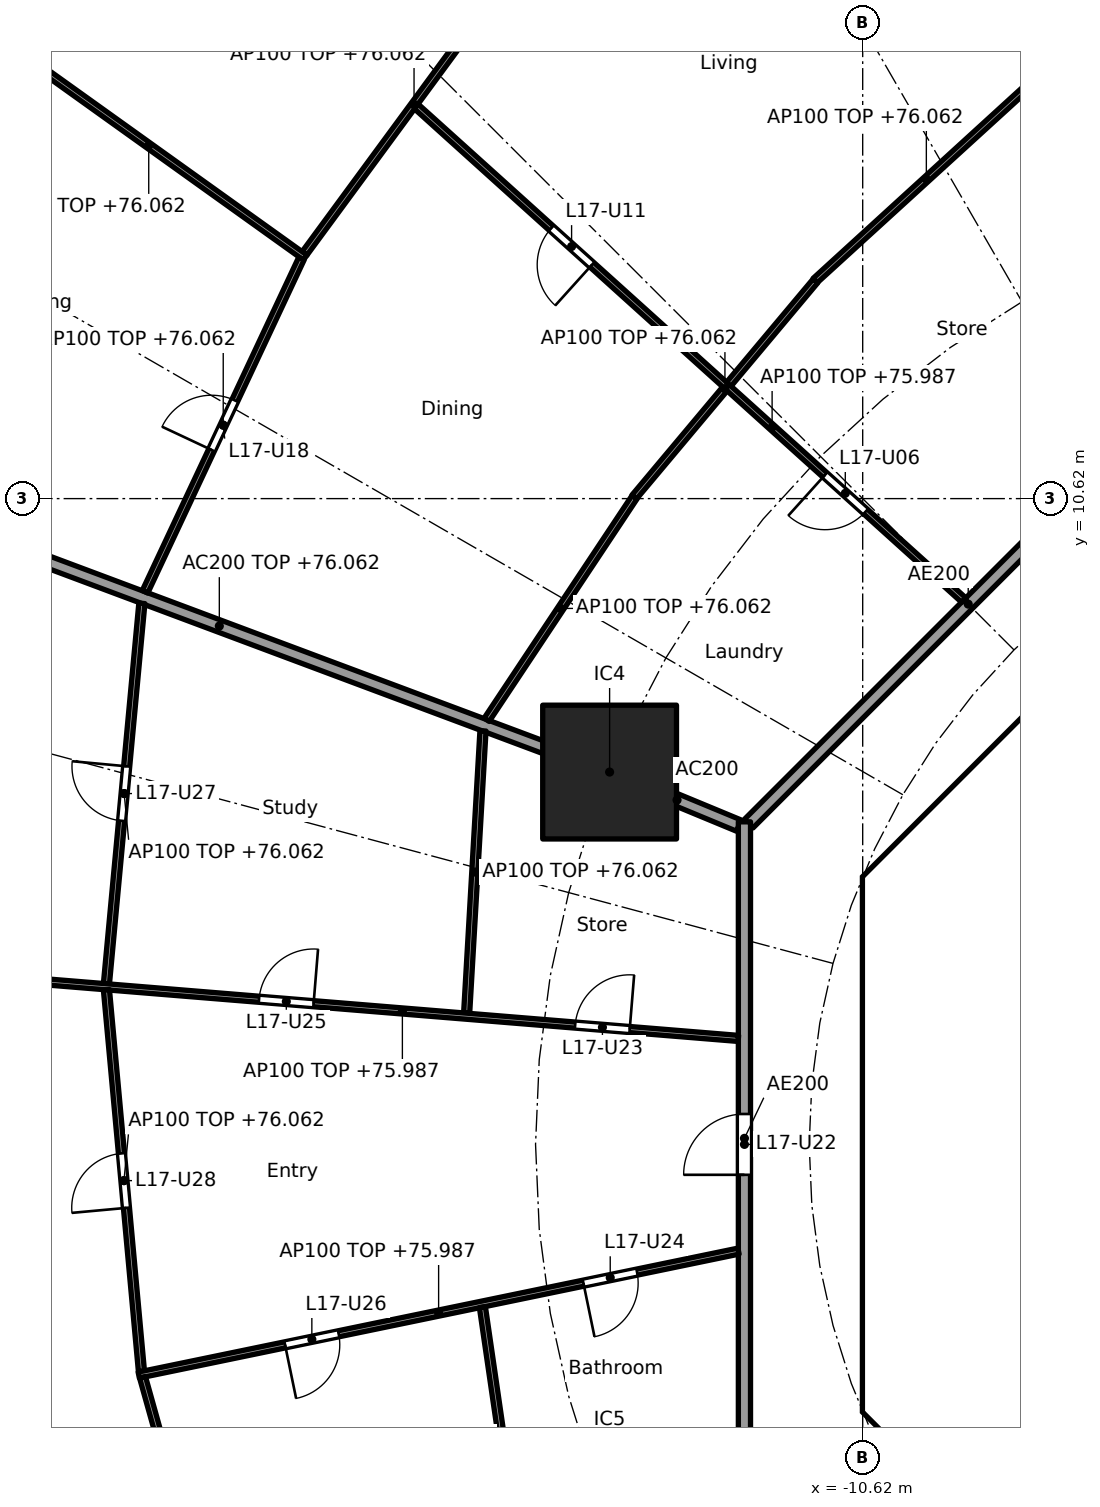
"""IFC4 building model, lengths in metres.
Left out: names, types, materials, properties, quantities, classifications, styles, units other than length and angle.
Written with IfcOpenShell. Run it as: python <this file> out.ifc"""

import sys

from ifc_helpers import new_model, si_unit, direction, frame, frame_2d, origin, origin_2d, place, context, subcontext, project, spatial, polyline, rectangle, outline, extrude, element, fill, save


model = new_model("IFC4")
c1 = context("Model", 3, precision=1e-05, world=origin(), true_north=direction((0.0, 1.0)))
c2 = subcontext(c1, "Body", "Model", "MODEL_VIEW")
j1 = project(units=[si_unit("LENGTHUNIT", "METRE"), si_unit("PLANEANGLEUNIT", "RADIAN")], contexts=[c1])
p1 = place(None, origin())
s1 = spatial("IfcSite", under=j1, at=p1, CompositionType="ELEMENT")
p2 = place(p1, origin())
s2 = spatial("IfcBuilding", under=s1, at=p2, CompositionType="ELEMENT")
p3 = place(p2, frame((0.0, 0.0, 73.3)))
s3 = spatial("IfcBuildingStorey", under=s2, at=p3, CompositionType="ELEMENT", Elevation=73.3)
p4 = place(p3, frame((-14.782, 6.123, 0.0), z_axis=(0.0, 0.0, 1.0), x_axis=(1.0, 0.0, 0.0)))
e1 = element("IfcColumn", 1, at=p4, inside=s3, PredefinedType="COLUMN", context=c2, shape_type="SweptSolid", body=[
    extrude(rectangle(XDim=2.2, YDim=2.2, at=origin_2d()), origin(), (0.0, 0.0, 1.0), 3.7),
])
p5 = place(p3, frame((-4.613, 9.988, 0.0), z_axis=(0.0, 0.0, 1.0), x_axis=(-0.707106781187, -0.707106781187, 0.0)))
e2 = element("IfcWall", 2, at=p5, inside=s3, PredefinedType="SHEAR", context=c2, shape_type="SweptSolid", body=[
    extrude(rectangle(XDim=7.602, YDim=0.6, at=frame_2d((3.801, 0.0))), origin(), (0.0, 0.0, 1.0), 3.44),
])
p6 = place(p5, frame((0.351, 0.0, 0.0)))
e3 = element("IfcOpeningElement", 3, at=p6, cuts=e2, PredefinedType="OPENING", context=c2, shape_type="SweptSolid", body=[
    extrude(rectangle(XDim=1.1, YDim=2.1, at=frame_2d((0.55, 1.05))), frame((0.0, 0.31, 0.0), z_axis=(0.0, -1.0, 0.0), x_axis=(1.0, 0.0, 0.0)), (0.0, 0.0, 1.0), 0.62),
])
p7 = place(p3, frame((-10.325, 3.801, 0.0), z_axis=(0.0, 0.0, 1.0), x_axis=(0.0, -1.0, 0.0)))
e4 = element("IfcWall", 4, at=p7, inside=s3, PredefinedType="SHEAR", context=c2, shape_type="SweptSolid", body=[
    extrude(rectangle(XDim=7.602, YDim=0.6, at=frame_2d((3.801, 0.0))), origin(), (0.0, 0.0, 1.0), 3.44),
])
p8 = place(p7, frame((0.651, 0.0, 0.0)))
e5 = element("IfcOpeningElement", 5, at=p8, cuts=e4, PredefinedType="OPENING", context=c2, shape_type="SweptSolid", body=[
    extrude(rectangle(XDim=1.5, YDim=2.1, at=frame_2d((0.75, 1.05))), frame((0.0, 0.31, 0.0), z_axis=(0.0, -1.0, 0.0), x_axis=(1.0, 0.0, 0.0)), (0.0, 0.0, 1.0), 0.62),
])
p9 = place(p7, frame((5.451, 0.0, 0.0)))
e6 = element("IfcOpeningElement", 6, at=p9, cuts=e4, PredefinedType="OPENING", context=c2, shape_type="SweptSolid", body=[
    extrude(rectangle(XDim=1.5, YDim=2.1, at=frame_2d((0.75, 1.05))), frame((0.0, 0.31, 0.0), z_axis=(0.0, -1.0, 0.0), x_axis=(1.0, 0.0, 0.0)), (0.0, 0.0, 1.0), 0.62),
])
p10 = place(p3, frame((-9.988, -4.613, 0.0), z_axis=(0.0, 0.0, 1.0), x_axis=(0.707106781187, -0.707106781187, 0.0)))
e7 = element("IfcWall", 7, at=p10, inside=s3, PredefinedType="SHEAR", context=c2, shape_type="SweptSolid", body=[
    extrude(rectangle(XDim=7.602, YDim=0.6, at=frame_2d((3.801, 0.0))), origin(), (0.0, 0.0, 1.0), 3.44),
])
p11 = place(p10, frame((6.151, 0.0, 0.0)))
e8 = element("IfcOpeningElement", 8, at=p11, cuts=e7, PredefinedType="OPENING", context=c2, shape_type="SweptSolid", body=[
    extrude(rectangle(XDim=1.1, YDim=2.1, at=frame_2d((0.55, 1.05))), frame((0.0, 0.31, 0.0), z_axis=(0.0, -1.0, 0.0), x_axis=(1.0, 0.0, 0.0)), (0.0, 0.0, 1.0), 0.62),
])
p12 = place(p3, origin())
e9 = element("IfcWall", 9, at=p12, inside=s3, PredefinedType="SHEAR", context=c2, shape_type="SweptSolid", body=[
    extrude(outline(polyline([(-10.625, -3.801), (-10.025, -3.801), (-10.025, -4.152), (-9.776, -4.401), (-10.2, -4.825), (-10.625, -4.401), (-10.625, -3.801)])), origin(), (0.0, 0.0, 1.0), 3.44),
])
p13 = place(p3, origin())
e10 = element("IfcWall", 10, at=p13, inside=s3, PredefinedType="SHEAR", context=c2, shape_type="SweptSolid", body=[
    extrude(outline(polyline([(-10.2, 4.825), (-9.776, 4.401), (-10.025, 4.152), (-10.025, 3.801), (-10.625, 3.801), (-10.625, 4.401), (-10.2, 4.825)])), origin(), (0.0, 0.0, 1.0), 3.44),
])
for number, where, z_axis, x_axis in (
    (11, (-10.025, -4.0, 0.0), (0.0, 0.0, 1.0), (1.0, 0.0, 0.0)),
    (12, (-10.025, 4.0, 0.0), (0.0, 0.0, 1.0), (1.0, 0.0, 0.0)),
):
    element("IfcWall", number, at=place(p3, frame(where, z_axis=z_axis, x_axis=x_axis)), inside=s3, PredefinedType="PARTITIONING", context=c2, shape_type="SweptSolid", body=[
        extrude(rectangle(XDim=3.325, YDim=0.2, at=frame_2d((1.662, 0.0))), origin(), (0.0, 0.0, 1.0), 3.44),
    ])
p14 = place(p3, frame((-8.301, 5.8, 0.0), z_axis=(0.0, 0.0, 1.0), x_axis=(1.0, 0.0, 0.0)))
e13 = element("IfcWall", 13, at=p14, inside=s3, PredefinedType="PARTITIONING", context=c2, shape_type="SweptSolid", body=[
    extrude(rectangle(XDim=2.026, YDim=0.15, at=frame_2d((1.013, 0.0))), origin(), (0.0, 0.0, 1.0), 3.44),
])
p15 = place(p3, frame((-12.657, 5.243, 0.0), z_axis=(0.0, 0.0, 1.0), x_axis=(-0.923843626288, 0.382770106157, 0.0)))
e14 = element("IfcWall", 14, at=p15, inside=s3, PredefinedType="PARTITIONING", context=c2, shape_type="SweptSolid", body=[
    extrude(rectangle(XDim=2.199, YDim=0.2, at=frame_2d((1.1, 0.0))), origin(), (0.0, 0.0, 1.0), 3.44),
])
p16 = place(p3, frame((-14.829, 6.14, 0.0), z_axis=(0.0, 0.0, 1.0), x_axis=(-0.936597324342, 0.35040755134, 0.0)))
e15 = element("IfcWall", 15, at=p16, inside=s3, PredefinedType="PARTITIONING", context=c2, shape_type="SweptSolid", body=[
    extrude(rectangle(XDim=13.606, YDim=0.2, at=frame_2d((6.803, 0.0))), origin(), (0.0, 0.0, 1.0), 2.762),
])
p17 = place(p3, frame((-5.275, 12.494, 0.0), z_axis=(0.0, 0.0, 1.0), x_axis=(-0.707106781187, -0.707106781187, 0.0)))
e16 = element("IfcWall", 16, at=p17, inside=s3, PredefinedType="PARTITIONING", context=c2, shape_type="SweptSolid", body=[
    extrude(rectangle(XDim=10.209, YDim=0.2, at=frame_2d((5.104, 0.0))), origin(), (0.0, 0.0, 1.0), 3.44),
])
p18 = place(p3, frame((-12.565, 5.304, 0.0), z_axis=(0.0, 0.0, 1.0), x_axis=(0.0, -1.0, 0.0)))
e17 = element("IfcWall", 17, at=p18, inside=s3, PredefinedType="PARTITIONING", context=c2, shape_type="SweptSolid", body=[
    extrude(rectangle(XDim=10.409, YDim=0.2, at=frame_2d((5.205, 0.0))), origin(), (0.0, 0.0, 1.0), 3.44),
])
p19 = place(p18, frame((4.804, 0.0, 0.0)))
e18 = element("IfcOpeningElement", 18, at=p19, cuts=e17, PredefinedType="OPENING", context=c2, shape_type="SweptSolid", body=[
    extrude(rectangle(XDim=1.0, YDim=2.1, at=frame_2d((0.5, 1.05))), frame((0.0, 0.11, 0.0), z_axis=(0.0, -1.0, 0.0), x_axis=(1.0, 0.0, 0.0)), (0.0, 0.0, 1.0), 0.22),
])
p20 = place(p3, frame((-6.072, 17.915, 0.0), z_axis=(0.0, 0.0, 1.0), x_axis=(-0.404139814253, 0.914697223422, 0.0)))
e19 = element("IfcWall", 19, at=p20, inside=s3, PredefinedType="PARTITIONING", context=c2, shape_type="SweptSolid", body=[
    extrude(rectangle(XDim=15.614, YDim=0.1, at=frame_2d((7.807, 0.0))), origin(), (0.0, 0.0, 1.0), 2.837),
])
p21 = place(p20, frame((3.226, 0.0, 0.0)))
e20 = element("IfcOpeningElement", 20, at=p21, cuts=e19, PredefinedType="OPENING", context=c2, shape_type="SweptSolid", body=[
    extrude(rectangle(XDim=0.9, YDim=2.1, at=frame_2d((0.45, 1.05))), frame((0.0, 0.06, 0.0), z_axis=(0.0, -1.0, 0.0), x_axis=(1.0, 0.0, 0.0)), (0.0, 0.0, 1.0), 0.12),
])
p22 = place(p3, frame((-7.746, 17.539, 0.0), z_axis=(0.0, 0.0, 1.0), x_axis=(-0.738860434967, -0.673858484877, 0.0)))
e21 = element("IfcWall", 21, at=p22, inside=s3, PredefinedType="PARTITIONING", context=c2, shape_type="SweptSolid", body=[
    extrude(rectangle(XDim=4.947, YDim=0.1, at=frame_2d((2.473, 0.0))), origin(), (0.0, 0.0, 1.0), 2.762),
])
p23 = place(p3, frame((-11.396, 14.202, 0.0), z_axis=(0.0, 0.0, 1.0), x_axis=(-0.642475660273, -0.766306091557, 0.0)))
e22 = element("IfcWall", 22, at=p23, inside=s3, PredefinedType="PARTITIONING", context=c2, shape_type="SweptSolid", body=[
    extrude(rectangle(XDim=4.637, YDim=0.1, at=frame_2d((2.319, 0.0))), origin(), (0.0, 0.0, 1.0), 2.762),
])
p24 = place(p3, frame((-16.197, 19.551, 0.0), z_axis=(0.0, 0.0, 1.0), x_axis=(-0.592391983588, -0.80564988536, 0.0)))
e23 = element("IfcWall", 23, at=p24, inside=s3, PredefinedType="PARTITIONING", context=c2, shape_type="SweptSolid", body=[
    extrude(rectangle(XDim=6.08, YDim=0.1, at=frame_2d((3.04, 0.0))), origin(), (0.0, 0.0, 1.0), 2.762),
])
p25 = place(p3, frame((-8.959, 8.952, 0.0), z_axis=(0.0, 0.0, 1.0), x_axis=(-0.742679904999, 0.669646592398, 0.0)))
e24 = element("IfcWall", 24, at=p25, inside=s3, PredefinedType="PARTITIONING", context=c2, shape_type="SweptSolid", body=[
    extrude(rectangle(XDim=12.121, YDim=0.1, at=frame_2d((6.061, 0.0))), origin(), (0.0, 0.0, 1.0), 2.687),
])
p26 = place(p25, frame((2.172, 0.0, 0.0)))
e25 = element("IfcOpeningElement", 25, at=p26, cuts=e24, PredefinedType="OPENING", context=c2, shape_type="SweptSolid", body=[
    extrude(rectangle(XDim=0.9, YDim=2.1, at=frame_2d((0.45, 1.05))), frame((0.0, 0.06, 0.0), z_axis=(0.0, -1.0, 0.0), x_axis=(1.0, 0.0, 0.0)), (0.0, 0.0, 1.0), 0.12),
])
p27 = place(p25, frame((8.233, 0.0, 0.0)))
e26 = element("IfcOpeningElement", 26, at=p27, cuts=e24, PredefinedType="OPENING", context=c2, shape_type="SweptSolid", body=[
    extrude(rectangle(XDim=0.9, YDim=2.1, at=frame_2d((0.45, 1.05))), frame((0.0, 0.06, 0.0), z_axis=(0.0, -1.0, 0.0), x_axis=(1.0, 0.0, 0.0)), (0.0, 0.0, 1.0), 0.12),
])
p28 = place(p3, frame((-14.371, 10.645, 0.0), z_axis=(0.0, 0.0, 1.0), x_axis=(-0.553341009285, -0.832954817168, 0.0)))
e27 = element("IfcWall", 27, at=p28, inside=s3, PredefinedType="PARTITIONING", context=c2, shape_type="SweptSolid", body=[
    extrude(rectangle(XDim=4.396, YDim=0.1, at=frame_2d((2.198, 0.0))), origin(), (0.0, 0.0, 1.0), 2.762),
])
p29 = place(p3, frame((-19.788, 14.583, 0.0), z_axis=(0.0, 0.0, 1.0), x_axis=(-0.813175286569, 0.58201885993, 0.0)))
e28 = element("IfcWall", 28, at=p29, inside=s3, PredefinedType="PARTITIONING", context=c2, shape_type="SweptSolid", body=[
    extrude(rectangle(XDim=6.329, YDim=0.1, at=frame_2d((3.164, 0.0))), origin(), (0.0, 0.0, 1.0), 2.762),
])
p30 = place(p3, frame((-19.85, 14.567, 0.0), z_axis=(0.0, 0.0, 1.0), x_axis=(-0.424942210745, -0.905220480064, 0.0)))
e29 = element("IfcWall", 29, at=p30, inside=s3, PredefinedType="PARTITIONING", context=c2, shape_type="SweptSolid", body=[
    extrude(rectangle(XDim=6.053, YDim=0.1, at=frame_2d((3.027, 0.0))), origin(), (0.0, 0.0, 1.0), 2.762),
])
p31 = place(p30, frame((2.577, 0.0, 0.0)))
e30 = element("IfcOpeningElement", 30, at=p31, cuts=e29, PredefinedType="OPENING", context=c2, shape_type="SweptSolid", body=[
    extrude(rectangle(XDim=0.9, YDim=2.1, at=frame_2d((0.45, 1.05))), frame((0.0, 0.06, 0.0), z_axis=(0.0, -1.0, 0.0), x_axis=(1.0, 0.0, 0.0)), (0.0, 0.0, 1.0), 0.12),
])
p32 = place(p3, frame((-16.865, 6.8, 0.0), z_axis=(0.0, 0.0, 1.0), x_axis=(-0.057758567218, -0.998330580476, 0.0)))
e31 = element("IfcWall", 31, at=p32, inside=s3, PredefinedType="PARTITIONING", context=c2, shape_type="SweptSolid", body=[
    extrude(rectangle(XDim=4.65, YDim=0.1, at=frame_2d((2.325, 0.0))), origin(), (0.0, 0.0, 1.0), 2.762),
])
p33 = place(p3, frame((-22.474, 8.898, 0.0), z_axis=(0.0, 0.0, 1.0), x_axis=(-0.092756864489, -0.995688788774, 0.0)))
e32 = element("IfcWall", 32, at=p33, inside=s3, PredefinedType="PARTITIONING", context=c2, shape_type="SweptSolid", body=[
    extrude(rectangle(XDim=6.283, YDim=0.1, at=frame_2d((3.141, 0.0))), origin(), (0.0, 0.0, 1.0), 2.762),
])
p34 = place(p33, frame((2.691, 0.0, 0.0)))
e33 = element("IfcOpeningElement", 33, at=p34, cuts=e32, PredefinedType="OPENING", context=c2, shape_type="SweptSolid", body=[
    extrude(rectangle(XDim=0.9, YDim=2.1, at=frame_2d((0.45, 1.05))), frame((0.0, 0.06, 0.0), z_axis=(0.0, -1.0, 0.0), x_axis=(1.0, 0.0, 0.0)), (0.0, 0.0, 1.0), 0.12),
])
p35 = place(p3, frame((-12.665, 1.743, 0.0), z_axis=(0.0, 0.0, 1.0), x_axis=(-0.996680482238, 0.081412630013, 0.0)))
e34 = element("IfcWall", 34, at=p35, inside=s3, PredefinedType="PARTITIONING", context=c2, shape_type="SweptSolid", body=[
    extrude(rectangle(XDim=15.84, YDim=0.1, at=frame_2d((7.92, 0.0))), origin(), (0.0, 0.0, 1.0), 2.687),
])
p36 = place(p35, frame((1.793, 0.0, 0.0)))
e35 = element("IfcOpeningElement", 35, at=p36, cuts=e34, PredefinedType="OPENING", context=c2, shape_type="SweptSolid", body=[
    extrude(rectangle(XDim=0.9, YDim=2.1, at=frame_2d((0.45, 1.05))), frame((0.0, 0.06, 0.0), z_axis=(0.0, -1.0, 0.0), x_axis=(1.0, 0.0, 0.0)), (0.0, 0.0, 1.0), 0.12),
])
p37 = place(p35, frame((7.009, 0.0, 0.0)))
e36 = element("IfcOpeningElement", 36, at=p37, cuts=e34, PredefinedType="OPENING", context=c2, shape_type="SweptSolid", body=[
    extrude(rectangle(XDim=0.9, YDim=2.1, at=frame_2d((0.45, 1.05))), frame((0.0, 0.06, 0.0), z_axis=(0.0, -1.0, 0.0), x_axis=(1.0, 0.0, 0.0)), (0.0, 0.0, 1.0), 0.12),
])
p38 = place(p3, frame((-23.057, 2.542, 0.0), z_axis=(0.0, 0.0, 1.0), x_axis=(0.091380945427, -0.995816008514, 0.0)))
e37 = element("IfcWall", 37, at=p38, inside=s3, PredefinedType="PARTITIONING", context=c2, shape_type="SweptSolid", body=[
    extrude(rectangle(XDim=6.302, YDim=0.1, at=frame_2d((3.151, 0.0))), origin(), (0.0, 0.0, 1.0), 2.762),
])
p39 = place(p38, frame((2.701, 0.0, 0.0)))
e38 = element("IfcOpeningElement", 38, at=p39, cuts=e37, PredefinedType="OPENING", context=c2, shape_type="SweptSolid", body=[
    extrude(rectangle(XDim=0.9, YDim=2.1, at=frame_2d((0.45, 1.05))), frame((0.0, 0.06, 0.0), z_axis=(0.0, -1.0, 0.0), x_axis=(1.0, 0.0, 0.0)), (0.0, 0.0, 1.0), 0.12),
])
p40 = place(p3, frame((-12.663, -1.755, 0.0), z_axis=(0.0, 0.0, 1.0), x_axis=(-0.979304677471, -0.202391572657, 0.0)))
e39 = element("IfcWall", 39, at=p40, inside=s3, PredefinedType="PARTITIONING", context=c2, shape_type="SweptSolid", body=[
    extrude(rectangle(XDim=10.071, YDim=0.1, at=frame_2d((5.036, 0.0))), origin(), (0.0, 0.0, 1.0), 2.687),
])
p41 = place(p40, frame((1.704, 0.0, 0.0)))
e40 = element("IfcOpeningElement", 40, at=p41, cuts=e39, PredefinedType="OPENING", context=c2, shape_type="SweptSolid", body=[
    extrude(rectangle(XDim=0.9, YDim=2.1, at=frame_2d((0.45, 1.05))), frame((0.0, 0.06, 0.0), z_axis=(0.0, -1.0, 0.0), x_axis=(1.0, 0.0, 0.0)), (0.0, 0.0, 1.0), 0.12),
])
p42 = place(p40, frame((6.714, 0.0, 0.0)))
e41 = element("IfcOpeningElement", 41, at=p42, cuts=e39, PredefinedType="OPENING", context=c2, shape_type="SweptSolid", body=[
    extrude(rectangle(XDim=0.9, YDim=2.1, at=frame_2d((0.45, 1.05))), frame((0.0, 0.06, 0.0), z_axis=(0.0, -1.0, 0.0), x_axis=(1.0, 0.0, 0.0)), (0.0, 0.0, 1.0), 0.12),
])
p43 = place(p3, frame((-16.874, -2.677, 0.0), z_axis=(0.0, 0.0, 1.0), x_axis=(0.144260658133, -0.989539722555, 0.0)))
e42 = element("IfcWall", 42, at=p43, inside=s3, PredefinedType="PARTITIONING", context=c2, shape_type="SweptSolid", body=[
    extrude(rectangle(XDim=4.309, YDim=0.1, at=frame_2d((2.154, 0.0))), origin(), (0.0, 0.0, 1.0), 2.762),
])
p44 = place(p3, frame((-22.463, -3.832, 0.0), z_axis=(0.0, 0.0, 1.0), x_axis=(0.269797759333, -0.962917010473, 0.0)))
e43 = element("IfcWall", 43, at=p44, inside=s3, PredefinedType="PARTITIONING", context=c2, shape_type="SweptSolid", body=[
    extrude(rectangle(XDim=6.043, YDim=0.1, at=frame_2d((3.021, 0.0))), origin(), (0.0, 0.0, 1.0), 2.762),
])
p45 = place(p8, origin())
e44 = element("IfcDoor", 44, at=p45, inside=s3, OperationType="DOUBLE_DOOR_SINGLE_SWING", PredefinedType="DOOR", context=c2, shape_type="SweptSolid", body=[
    extrude(rectangle(XDim=1.5, YDim=2.1, at=frame_2d((0.75, 1.05))), frame((0.0, 0.025, 0.0), z_axis=(0.0, -1.0, 0.0), x_axis=(1.0, 0.0, 0.0)), (0.0, 0.0, 1.0), 0.05),
])
fill(e5, e44)
p46 = place(p9, origin())
e45 = element("IfcDoor", 45, at=p46, inside=s3, OperationType="DOUBLE_DOOR_SINGLE_SWING", PredefinedType="DOOR", context=c2, shape_type="SweptSolid", body=[
    extrude(rectangle(XDim=1.5, YDim=2.1, at=frame_2d((0.75, 1.05))), frame((0.0, 0.025, 0.0), z_axis=(0.0, -1.0, 0.0), x_axis=(1.0, 0.0, 0.0)), (0.0, 0.0, 1.0), 0.05),
])
fill(e6, e45)
p47 = place(p26, origin())
e46 = element("IfcDoor", 46, at=p47, inside=s3, OperationType="SINGLE_SWING_RIGHT", PredefinedType="DOOR", context=c2, shape_type="SweptSolid", body=[
    extrude(rectangle(XDim=0.9, YDim=2.1, at=frame_2d((0.45, 1.05))), frame((0.0, 0.025, 0.0), z_axis=(0.0, -1.0, 0.0), x_axis=(1.0, 0.0, 0.0)), (0.0, 0.0, 1.0), 0.05),
])
fill(e25, e46)
p48 = place(p27, origin())
e47 = element("IfcDoor", 47, at=p48, inside=s3, OperationType="SINGLE_SWING_LEFT", PredefinedType="DOOR", context=c2, shape_type="SweptSolid", body=[
    extrude(rectangle(XDim=0.9, YDim=2.1, at=frame_2d((0.45, 1.05))), frame((0.0, 0.025, 0.0), z_axis=(0.0, -1.0, 0.0), x_axis=(1.0, 0.0, 0.0)), (0.0, 0.0, 1.0), 0.05),
])
fill(e26, e47)
p49 = place(p31, frame((0.9, 0.0, 0.0), x_axis=(-1.0, 0.0, 0.0)))
e48 = element("IfcDoor", 48, at=p49, inside=s3, OperationType="SINGLE_SWING_LEFT", PredefinedType="DOOR", context=c2, shape_type="SweptSolid", body=[
    extrude(rectangle(XDim=0.9, YDim=2.1, at=frame_2d((0.45, 1.05))), frame((0.0, 0.025, 0.0), z_axis=(0.0, -1.0, 0.0), x_axis=(1.0, 0.0, 0.0)), (0.0, 0.0, 1.0), 0.05),
])
fill(e30, e48)
p50 = place(p19, frame((1.0, 0.0, 0.0), x_axis=(-1.0, 0.0, 0.0)))
e49 = element("IfcDoor", 49, at=p50, inside=s3, OperationType="SINGLE_SWING_LEFT", PredefinedType="DOOR", context=c2, shape_type="SweptSolid", body=[
    extrude(rectangle(XDim=1.0, YDim=2.1, at=frame_2d((0.5, 1.05))), frame((0.0, 0.025, 0.0), z_axis=(0.0, -1.0, 0.0), x_axis=(1.0, 0.0, 0.0)), (0.0, 0.0, 1.0), 0.05),
])
fill(e18, e49)
p51 = place(p36, frame((0.9, 0.0, 0.0), x_axis=(-1.0, 0.0, 0.0)))
e50 = element("IfcDoor", 50, at=p51, inside=s3, OperationType="SINGLE_SWING_RIGHT", PredefinedType="DOOR", context=c2, shape_type="SweptSolid", body=[
    extrude(rectangle(XDim=0.9, YDim=2.1, at=frame_2d((0.45, 1.05))), frame((0.0, 0.025, 0.0), z_axis=(0.0, -1.0, 0.0), x_axis=(1.0, 0.0, 0.0)), (0.0, 0.0, 1.0), 0.05),
])
fill(e35, e50)
p52 = place(p41, origin())
e51 = element("IfcDoor", 51, at=p52, inside=s3, OperationType="SINGLE_SWING_RIGHT", PredefinedType="DOOR", context=c2, shape_type="SweptSolid", body=[
    extrude(rectangle(XDim=0.9, YDim=2.1, at=frame_2d((0.45, 1.05))), frame((0.0, 0.025, 0.0), z_axis=(0.0, -1.0, 0.0), x_axis=(1.0, 0.0, 0.0)), (0.0, 0.0, 1.0), 0.05),
])
fill(e40, e51)
p53 = place(p37, frame((0.9, 0.0, 0.0), x_axis=(-1.0, 0.0, 0.0)))
e52 = element("IfcDoor", 52, at=p53, inside=s3, OperationType="SINGLE_SWING_RIGHT", PredefinedType="DOOR", context=c2, shape_type="SweptSolid", body=[
    extrude(rectangle(XDim=0.9, YDim=2.1, at=frame_2d((0.45, 1.05))), frame((0.0, 0.025, 0.0), z_axis=(0.0, -1.0, 0.0), x_axis=(1.0, 0.0, 0.0)), (0.0, 0.0, 1.0), 0.05),
])
fill(e36, e52)
p54 = place(p42, origin())
e53 = element("IfcDoor", 53, at=p54, inside=s3, OperationType="SINGLE_SWING_RIGHT", PredefinedType="DOOR", context=c2, shape_type="SweptSolid", body=[
    extrude(rectangle(XDim=0.9, YDim=2.1, at=frame_2d((0.45, 1.05))), frame((0.0, 0.025, 0.0), z_axis=(0.0, -1.0, 0.0), x_axis=(1.0, 0.0, 0.0)), (0.0, 0.0, 1.0), 0.05),
])
fill(e41, e53)
p55 = place(p34, frame((0.9, 0.0, 0.0), x_axis=(-1.0, 0.0, 0.0)))
e54 = element("IfcDoor", 54, at=p55, inside=s3, OperationType="SINGLE_SWING_RIGHT", PredefinedType="DOOR", context=c2, shape_type="SweptSolid", body=[
    extrude(rectangle(XDim=0.9, YDim=2.1, at=frame_2d((0.45, 1.05))), frame((0.0, 0.025, 0.0), z_axis=(0.0, -1.0, 0.0), x_axis=(1.0, 0.0, 0.0)), (0.0, 0.0, 1.0), 0.05),
])
fill(e33, e54)
p56 = place(p39, frame((0.9, 0.0, 0.0), x_axis=(-1.0, 0.0, 0.0)))
e55 = element("IfcDoor", 55, at=p56, inside=s3, OperationType="SINGLE_SWING_LEFT", PredefinedType="DOOR", context=c2, shape_type="SweptSolid", body=[
    extrude(rectangle(XDim=0.9, YDim=2.1, at=frame_2d((0.45, 1.05))), frame((0.0, 0.025, 0.0), z_axis=(0.0, -1.0, 0.0), x_axis=(1.0, 0.0, 0.0)), (0.0, 0.0, 1.0), 0.05),
])
fill(e38, e55)
save(model, sys.argv[1])
